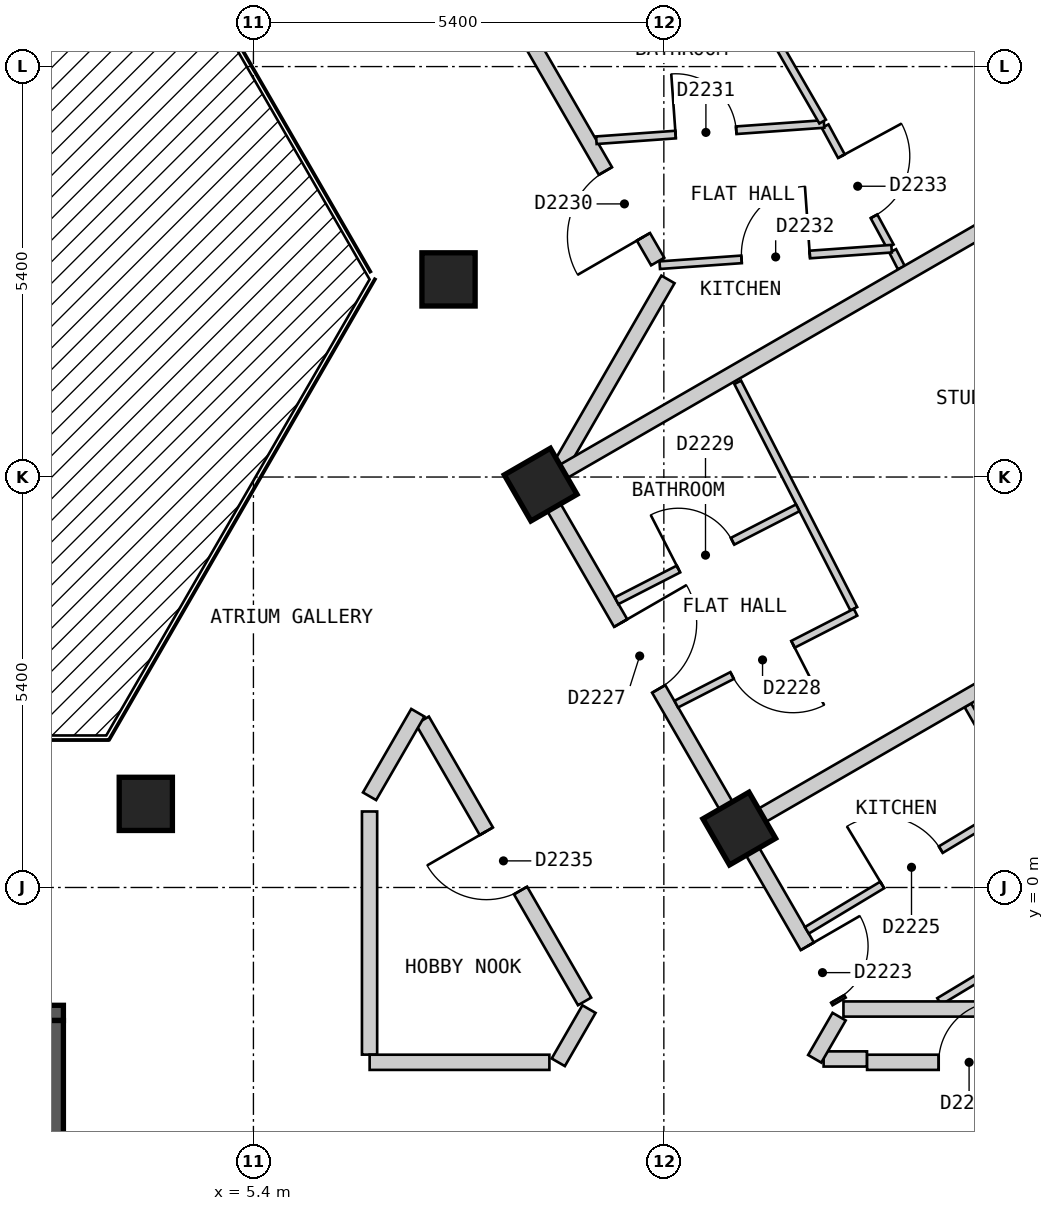
"""IFC4 building model, lengths in metres.
Left out: names, types, materials, properties, quantities, classifications, styles, units other than length and angle.
Written with IfcOpenShell. Run it as: python <this file> out.ifc"""

import sys

from ifc_helpers import new_model, si_unit, direction, frame, frame_2d, origin, origin_2d, place, context, subcontext, project, spatial, polyline, rectangle, outline, extrude, element, fill, save


model = new_model("IFC4")
c1 = context("Model", 3, precision=1e-05, world=origin(), true_north=direction((0.0, 1.0)))
c2 = subcontext(c1, "Body", "Model", "MODEL_VIEW")
j1 = project(units=[si_unit("LENGTHUNIT", "METRE"), si_unit("PLANEANGLEUNIT", "RADIAN")], contexts=[c1])
p1 = place(None, origin())
s1 = spatial("IfcSite", under=j1, at=p1, CompositionType="ELEMENT")
p2 = place(p1, origin())
s2 = spatial("IfcBuilding", under=s1, at=p2, CompositionType="ELEMENT")
p3 = place(p2, frame((0.0, 0.0, 223.8)))
s3 = spatial("IfcBuildingStorey", under=s2, at=p3, CompositionType="ELEMENT", Elevation=223.8)
for number, where, z_axis, x_axis in (
    (1, (11.792, 0.775, 0.0), (0.0, 0.0, 1.0), (-0.5, 0.866, 0.0)),
    (2, (3.984, 1.1, 0.0), (0.0, 0.0, 1.0), (1.0, 0.0, 0.0)),
    (3, (9.179, 5.3, 0.0), (0.0, 0.0, 1.0), (-0.5, 0.866, 0.0)),
    (4, (7.967, 8.0, 0.0), (0.0, 0.0, 1.0), (1.0, 0.0, 0.0)),
):
    element("IfcColumn", number, at=place(p3, frame(where, z_axis=z_axis, x_axis=x_axis)), inside=s3, PredefinedType="COLUMN", context=c2, shape_type="SweptSolid", body=[
        extrude(rectangle(XDim=0.7, YDim=0.7, at=origin_2d()), origin(), (0.0, 0.0, 1.0), 3.0),
    ])
p4 = place(p3, frame((23.599, 0.825, 0.0), z_axis=(0.0, 0.0, 1.0), x_axis=(-0.500003656944, 0.866023292436, 0.0)))
e5 = element("IfcWall", 5, at=p4, inside=s3, PredefinedType="SOLIDWALL", context=c2, shape_type="SweptSolid", body=[
    extrude(outline(polyline([(0.0, -0.15), (22.17, -0.15), (22.09, 0.15), (0.08, 0.15), (0.0, -0.15)])), origin(), (0.0, 0.0, 1.0), 2.7),
])
p5 = place(p4, frame((2.497, 0.0, 0.15)))
e6 = element("IfcOpeningElement", 6, at=p5, cuts=e5, PredefinedType="OPENING", context=c2, shape_type="SweptSolid", body=[
    extrude(rectangle(XDim=1.5, YDim=2.1, at=frame_2d((0.75, 1.05))), frame((0.0, 0.16, 0.0), z_axis=(0.0, -1.0, 0.0), x_axis=(1.0, 0.0, 0.0)), (0.0, 0.0, 1.0), 0.32),
])
p6 = place(p4, frame((7.723, 0.0, 0.15)))
e7 = element("IfcOpeningElement", 7, at=p6, cuts=e5, PredefinedType="OPENING", context=c2, shape_type="SweptSolid", body=[
    extrude(rectangle(XDim=1.5, YDim=2.1, at=frame_2d((0.75, 1.05))), frame((0.0, 0.16, 0.0), z_axis=(0.0, -1.0, 0.0), x_axis=(1.0, 0.0, 0.0)), (0.0, 0.0, 1.0), 0.32),
])
p7 = place(p4, frame((12.948, 0.0, 0.15)))
e8 = element("IfcOpeningElement", 8, at=p7, cuts=e5, PredefinedType="OPENING", context=c2, shape_type="SweptSolid", body=[
    extrude(rectangle(XDim=1.5, YDim=2.1, at=frame_2d((0.75, 1.05))), frame((0.0, 0.16, 0.0), z_axis=(0.0, -1.0, 0.0), x_axis=(1.0, 0.0, 0.0)), (0.0, 0.0, 1.0), 0.32),
])
p8 = place(p4, frame((18.173, 0.0, 0.15)))
e9 = element("IfcOpeningElement", 9, at=p8, cuts=e5, PredefinedType="OPENING", context=c2, shape_type="SweptSolid", body=[
    extrude(rectangle(XDim=1.5, YDim=2.1, at=frame_2d((0.75, 1.05))), frame((0.0, 0.16, 0.0), z_axis=(0.0, -1.0, 0.0), x_axis=(1.0, 0.0, 0.0)), (0.0, 0.0, 1.0), 0.32),
])
p9 = place(p3, frame((-2.9, -1.65, 0.0), z_axis=(0.0, 0.0, 1.0), x_axis=(1.0, 0.0, 0.0)))
e10 = element("IfcWall", 10, at=p9, inside=s3, PredefinedType="SOLIDWALL", context=c2, shape_type="SweptSolid", body=[
    extrude(rectangle(XDim=5.8, YDim=0.2, at=frame_2d((2.9, 0.0))), origin(), (0.0, 0.0, 1.0), 2.7),
])
p10 = place(p9, frame((0.3, 0.0, 0.0)))
e11 = element("IfcOpeningElement", 11, at=p10, cuts=e10, PredefinedType="OPENING", context=c2, shape_type="SweptSolid", body=[
    extrude(rectangle(XDim=1.2, YDim=2.1, at=frame_2d((0.6, 1.05))), frame((0.0, 0.11, 0.0), z_axis=(0.0, -1.0, 0.0), x_axis=(1.0, 0.0, 0.0)), (0.0, 0.0, 1.0), 0.22),
])
p11 = place(p3, frame((2.8, -4.5, 0.0), z_axis=(0.0, 0.0, 1.0), x_axis=(0.0, 1.0, 0.0)))
e12 = element("IfcWall", 12, at=p11, inside=s3, PredefinedType="SOLIDWALL", context=c2, shape_type="SweptSolid", body=[
    extrude(rectangle(XDim=2.75, YDim=0.2, at=frame_2d((1.375, 0.0))), origin(), (0.0, 0.0, 1.0), 2.7),
])
p12 = place(p3, frame((7.622, 2.199, 0.0), z_axis=(0.0, 0.0, 1.0), x_axis=(0.499994660107, -0.866028486751, 0.0)))
e13 = element("IfcWall", 13, at=p12, inside=s3, PredefinedType="PARTITIONING", context=c2, shape_type="SweptSolid", body=[
    extrude(rectangle(XDim=4.27, YDim=0.2, at=frame_2d((2.135, 0.0))), origin(), (0.0, 0.0, 1.0), 2.7),
])
p13 = place(p12, frame((1.685, 0.0, 0.0)))
e14 = element("IfcOpeningElement", 14, at=p13, cuts=e13, PredefinedType="OPENING", context=c2, shape_type="SweptSolid", body=[
    extrude(rectangle(XDim=0.9, YDim=2.1, at=frame_2d((0.45, 1.05))), frame((0.0, 0.11, 0.0), z_axis=(0.0, -1.0, 0.0), x_axis=(1.0, 0.0, 0.0)), (0.0, 0.0, 1.0), 0.22),
])
p14 = place(p3, frame((9.238, 5.2, 0.0), z_axis=(0.0, 0.0, 1.0), x_axis=(0.500025705601, -0.86601056214, 0.0)))
e15 = element("IfcWall", 15, at=p14, inside=s3, PredefinedType="PARTITIONING", context=c2, shape_type="SweptSolid", body=[
    extrude(rectangle(XDim=7.735, YDim=0.2, at=frame_2d((3.868, 0.0))), origin(), (0.0, 0.0, 1.0), 2.7),
])
p15 = place(p14, frame((6.898, 0.0, 0.0)))
e16 = element("IfcOpeningElement", 16, at=p15, cuts=e15, PredefinedType="OPENING", context=c2, shape_type="SweptSolid", body=[
    extrude(rectangle(XDim=0.8, YDim=2.1, at=frame_2d((0.4, 1.05))), frame((0.0, 0.11, 0.0), z_axis=(0.0, -1.0, 0.0), x_axis=(1.0, 0.0, 0.0)), (0.0, 0.0, 1.0), 0.22),
])
p16 = place(p14, frame((1.988, 0.0, 0.0)))
e17 = element("IfcOpeningElement", 17, at=p16, cuts=e15, PredefinedType="OPENING", context=c2, shape_type="SweptSolid", body=[
    extrude(rectangle(XDim=1.0, YDim=2.1, at=frame_2d((0.5, 1.05))), frame((0.0, 0.11, 0.0), z_axis=(0.0, -1.0, 0.0), x_axis=(1.0, 0.0, 0.0)), (0.0, 0.0, 1.0), 0.22),
])
p17 = place(p3, frame((5.485, 17.3, 0.0), z_axis=(0.0, 0.0, 1.0), x_axis=(0.500017221754, -0.866015460572, 0.0)))
e18 = element("IfcWall", 18, at=p17, inside=s3, PredefinedType="PARTITIONING", context=c2, shape_type="SweptSolid", body=[
    extrude(rectangle(XDim=10.468, YDim=0.2, at=frame_2d((5.234, 0.0))), origin(), (0.0, 0.0, 1.0), 2.7),
])
p18 = place(p17, frame((9.092, 0.0, 0.0)))
e19 = element("IfcOpeningElement", 19, at=p18, cuts=e18, PredefinedType="OPENING", context=c2, shape_type="SweptSolid", body=[
    extrude(rectangle(XDim=1.0, YDim=2.1, at=frame_2d((0.5, 1.05))), frame((0.0, 0.11, 0.0), z_axis=(0.0, -1.0, 0.0), x_axis=(1.0, 0.0, 0.0)), (0.0, 0.0, 1.0), 0.22),
])
p19 = place(p3, frame((6.928, 1.0, 0.0), z_axis=(0.0, 0.0, 1.0), x_axis=(0.0, -1.0, 0.0)))
e20 = element("IfcWall", 20, at=p19, inside=s3, PredefinedType="PARTITIONING", context=c2, shape_type="SweptSolid", body=[
    extrude(rectangle(XDim=3.199, YDim=0.2, at=frame_2d((1.6, 0.0))), origin(), (0.0, 0.0, 1.0), 2.7),
])
p20 = place(p3, frame((12.902, -2.256, 0.0), z_axis=(0.0, 0.0, 1.0), x_axis=(1.0, 0.0, 0.0)))
e21 = element("IfcWall", 21, at=p20, inside=s3, PredefinedType="PARTITIONING", context=c2, shape_type="SweptSolid", body=[
    extrude(rectangle(XDim=0.571, YDim=0.2, at=frame_2d((0.285, 0.0))), origin(), (0.0, 0.0, 1.0), 2.7),
])
p21 = place(p3, frame((6.929, -2.3, 0.0), z_axis=(0.0, 0.0, 1.0), x_axis=(1.0, 0.0, 0.0)))
e22 = element("IfcWall", 22, at=p21, inside=s3, PredefinedType="PARTITIONING", context=c2, shape_type="SweptSolid", body=[
    extrude(rectangle(XDim=2.365, YDim=0.2, at=frame_2d((1.183, 0.0))), origin(), (0.0, 0.0, 1.0), 2.7),
])
p22 = place(p3, frame((13.474, -2.3, 0.0), z_axis=(0.0, 0.0, 1.0), x_axis=(1.0, 0.0, 0.0)))
e23 = element("IfcWall", 23, at=p22, inside=s3, PredefinedType="PARTITIONING", context=c2, shape_type="SweptSolid", body=[
    extrude(rectangle(XDim=2.934, YDim=0.2, at=frame_2d((1.467, 0.0))), origin(), (0.0, 0.0, 1.0), 2.7),
])
p23 = place(p22, frame((0.942, 0.0, 0.0)))
e24 = element("IfcOpeningElement", 24, at=p23, cuts=e23, PredefinedType="OPENING", context=c2, shape_type="SweptSolid", body=[
    extrude(rectangle(XDim=0.8, YDim=2.1, at=frame_2d((0.4, 1.05))), frame((0.0, 0.11, 0.0), z_axis=(0.0, -1.0, 0.0), x_axis=(1.0, 0.0, 0.0)), (0.0, 0.0, 1.0), 0.22),
])
p24 = place(p3, frame((6.928, 1.2, 0.0), z_axis=(0.0, 0.0, 1.0), x_axis=(0.500255167297, 0.865878032746, 0.0)))
e25 = element("IfcWall", 25, at=p24, inside=s3, PredefinedType="PARTITIONING", context=c2, shape_type="SweptSolid", body=[
    extrude(rectangle(XDim=1.269, YDim=0.2, at=frame_2d((0.635, 0.0))), origin(), (0.0, 0.0, 1.0), 2.7),
])
p25 = place(p3, frame((9.354, 5.401, 0.0), z_axis=(0.0, 0.0, 1.0), x_axis=(0.499849222119, 0.866112437936, 0.0)))
e26 = element("IfcWall", 26, at=p25, inside=s3, PredefinedType="PARTITIONING", context=c2, shape_type="SweptSolid", body=[
    extrude(rectangle(XDim=3.001, YDim=0.2, at=frame_2d((1.5, 0.0))), origin(), (0.0, 0.0, 1.0), 2.7),
])
p26 = place(p3, frame((9.411, -2.3, 0.0), z_axis=(0.0, 0.0, 1.0), x_axis=(0.499940363534, 0.866059832176, 0.0)))
e27 = element("IfcWall", 27, at=p26, inside=s3, PredefinedType="PARTITIONING", context=c2, shape_type="SweptSolid", body=[
    extrude(rectangle(XDim=0.808, YDim=0.2, at=frame_2d((0.404, 0.0))), origin(), (0.0, 0.0, 1.0), 2.7),
])
p27 = place(p3, frame((12.785, -2.254, 0.0), z_axis=(0.0, 0.0, 1.0), x_axis=(0.500766044352, 0.865582675903, 0.0)))
e28 = element("IfcWall", 28, at=p27, inside=s3, PredefinedType="PARTITIONING", context=c2, shape_type="SweptSolid", body=[
    extrude(rectangle(XDim=0.641, YDim=0.2, at=frame_2d((0.321, 0.0))), origin(), (0.0, 0.0, 1.0), 2.7),
])
p28 = place(p3, frame((14.8, 2.397, 0.0), z_axis=(0.0, 0.0, 1.0), x_axis=(0.49989805765, -0.866084252228, 0.0)))
e29 = element("IfcWall", 29, at=p28, inside=s3, PredefinedType="PARTITIONING", context=c2, shape_type="SweptSolid", body=[
    extrude(rectangle(XDim=1.404, YDim=0.1, at=frame_2d((0.702, 0.0))), origin(), (0.0, 0.0, 1.0), 2.7),
])
p29 = place(p3, frame((12.922, 10.016, 0.0), z_axis=(0.0, 0.0, 1.0), x_axis=(0.476510550025, -0.879168752695, 0.0)))
e30 = element("IfcWall", 30, at=p29, inside=s3, PredefinedType="PARTITIONING", context=c2, shape_type="SweptSolid", body=[
    extrude(rectangle(XDim=1.798, YDim=0.1, at=frame_2d((0.899, 0.0))), origin(), (0.0, 0.0, 1.0), 2.7),
])
p30 = place(p29, frame((0.449, 0.0, 0.0)))
e31 = element("IfcOpeningElement", 31, at=p30, cuts=e30, PredefinedType="OPENING", context=c2, shape_type="SweptSolid", body=[
    extrude(rectangle(XDim=0.9, YDim=2.1, at=frame_2d((0.45, 1.05))), frame((0.0, 0.06, 0.0), z_axis=(0.0, -1.0, 0.0), x_axis=(1.0, 0.0, 0.0)), (0.0, 0.0, 1.0), 0.12),
])
p31 = place(p3, frame((13.811, 8.375, 0.0), z_axis=(0.0, 0.0, 1.0), x_axis=(0.457058020142, -0.889436881529, 0.0)))
e32 = element("IfcWall", 32, at=p31, inside=s3, PredefinedType="PARTITIONING", context=c2, shape_type="SweptSolid", body=[
    extrude(rectangle(XDim=0.247, YDim=0.1, at=frame_2d((0.124, 0.0))), origin(), (0.0, 0.0, 1.0), 2.7),
])
p32 = place(p3, frame((11.772, 6.646, 0.0), z_axis=(0.0, 0.0, 1.0), x_axis=(0.456175983405, -0.889889584254, 0.0)))
e33 = element("IfcWall", 33, at=p32, inside=s3, PredefinedType="PARTITIONING", context=c2, shape_type="SweptSolid", body=[
    extrude(rectangle(XDim=3.348, YDim=0.1, at=frame_2d((1.674, 0.0))), origin(), (0.0, 0.0, 1.0), 2.7),
])
p33 = place(p3, frame((10.178, 3.772, 0.0), z_axis=(0.0, 0.0, 1.0), x_axis=(0.889732071959, 0.456483121405, 0.0)))
e34 = element("IfcWall", 34, at=p33, inside=s3, PredefinedType="PARTITIONING", context=c2, shape_type="SweptSolid", body=[
    extrude(rectangle(XDim=2.679, YDim=0.1, at=frame_2d((1.34, 0.0))), origin(), (0.0, 0.0, 1.0), 2.7),
])
p34 = place(p33, frame((0.915, 0.0, 0.0)))
e35 = element("IfcOpeningElement", 35, at=p34, cuts=e34, PredefinedType="OPENING", context=c2, shape_type="SweptSolid", body=[
    extrude(rectangle(XDim=0.8, YDim=2.1, at=frame_2d((0.4, 1.05))), frame((0.0, 0.06, 0.0), z_axis=(0.0, -1.0, 0.0), x_axis=(1.0, 0.0, 0.0)), (0.0, 0.0, 1.0), 0.12),
])
p35 = place(p3, frame((10.963, 2.412, 0.0), z_axis=(0.0, 0.0, 1.0), x_axis=(0.889943997558, 0.456069820543, 0.0)))
e36 = element("IfcWall", 36, at=p35, inside=s3, PredefinedType="PARTITIONING", context=c2, shape_type="SweptSolid", body=[
    extrude(rectangle(XDim=2.651, YDim=0.1, at=frame_2d((1.325, 0.0))), origin(), (0.0, 0.0, 1.0), 2.7),
])
p36 = place(p35, frame((0.826, 0.0, 0.0)))
e37 = element("IfcOpeningElement", 37, at=p36, cuts=e36, PredefinedType="OPENING", context=c2, shape_type="SweptSolid", body=[
    extrude(rectangle(XDim=0.9, YDim=2.1, at=frame_2d((0.45, 1.05))), frame((0.0, 0.06, 0.0), z_axis=(0.0, -1.0, 0.0), x_axis=(1.0, 0.0, 0.0)), (0.0, 0.0, 1.0), 0.12),
])
p37 = place(p3, frame((12.681, -0.564, 0.0), z_axis=(0.0, 0.0, 1.0), x_axis=(0.856575482301, 0.516021746752, 0.0)))
e38 = element("IfcWall", 38, at=p37, inside=s3, PredefinedType="PARTITIONING", context=c2, shape_type="SweptSolid", body=[
    extrude(rectangle(XDim=3.316, YDim=0.1, at=frame_2d((1.658, 0.0))), origin(), (0.0, 0.0, 1.0), 2.7),
])
p38 = place(p37, frame((1.158, 0.0, 0.0)))
e39 = element("IfcOpeningElement", 39, at=p38, cuts=e38, PredefinedType="OPENING", context=c2, shape_type="SweptSolid", body=[
    extrude(rectangle(XDim=0.9, YDim=2.1, at=frame_2d((0.45, 1.05))), frame((0.0, 0.06, 0.0), z_axis=(0.0, -1.0, 0.0), x_axis=(1.0, 0.0, 0.0)), (0.0, 0.0, 1.0), 0.12),
])
p39 = place(p3, frame((14.423, -1.499, 0.0), z_axis=(0.0, 0.0, 1.0), x_axis=(0.856512638305, 0.516126050905, 0.0)))
e40 = element("IfcWall", 40, at=p39, inside=s3, PredefinedType="PARTITIONING", context=c2, shape_type="SweptSolid", body=[
    extrude(rectangle(XDim=4.776, YDim=0.1, at=frame_2d((2.388, 0.0))), origin(), (0.0, 0.0, 1.0), 2.7),
])
p40 = place(p39, frame((1.936, 0.0, 0.0)))
e41 = element("IfcOpeningElement", 41, at=p40, cuts=e40, PredefinedType="OPENING", context=c2, shape_type="SweptSolid", body=[
    extrude(rectangle(XDim=0.8, YDim=2.1, at=frame_2d((0.4, 1.05))), frame((0.0, 0.06, 0.0), z_axis=(0.0, -1.0, 0.0), x_axis=(1.0, 0.0, 0.0)), (0.0, 0.0, 1.0), 0.12),
])
p41 = place(p3, frame((10.746, 8.187, 0.0), z_axis=(0.0, 0.0, 1.0), x_axis=(0.997477310687, 0.070986017387, 0.0)))
e42 = element("IfcWall", 42, at=p41, inside=s3, PredefinedType="PARTITIONING", context=c2, shape_type="SweptSolid", body=[
    extrude(rectangle(XDim=3.058, YDim=0.1, at=frame_2d((1.529, 0.0))), origin(), (0.0, 0.0, 1.0), 2.7),
])
p42 = place(p41, frame((1.079, 0.0, 0.0)))
e43 = element("IfcOpeningElement", 43, at=p42, cuts=e42, PredefinedType="OPENING", context=c2, shape_type="SweptSolid", body=[
    extrude(rectangle(XDim=0.9, YDim=2.1, at=frame_2d((0.45, 1.05))), frame((0.0, 0.06, 0.0), z_axis=(0.0, -1.0, 0.0), x_axis=(1.0, 0.0, 0.0)), (0.0, 0.0, 1.0), 0.12),
])
p43 = place(p3, frame((9.912, 9.831, 0.0), z_axis=(0.0, 0.0, 1.0), x_axis=(0.997459937941, 0.071229714326, 0.0)))
e44 = element("IfcWall", 44, at=p43, inside=s3, PredefinedType="PARTITIONING", context=c2, shape_type="SweptSolid", body=[
    extrude(rectangle(XDim=3.002, YDim=0.1, at=frame_2d((1.501, 0.0))), origin(), (0.0, 0.0, 1.0), 2.7),
])
p44 = place(p43, frame((1.045, 0.0, 0.0)))
e45 = element("IfcOpeningElement", 45, at=p44, cuts=e44, PredefinedType="OPENING", context=c2, shape_type="SweptSolid", body=[
    extrude(rectangle(XDim=0.8, YDim=2.1, at=frame_2d((0.4, 1.05))), frame((0.0, 0.06, 0.0), z_axis=(0.0, -1.0, 0.0), x_axis=(1.0, 0.0, 0.0)), (0.0, 0.0, 1.0), 0.12),
])
p45 = place(p3, frame((13.163, -1.599, 0.0), z_axis=(0.0, 0.0, 1.0), x_axis=(1.0, 0.0, 0.0)))
e46 = element("IfcWall", 46, at=p45, inside=s3, PredefinedType="PARTITIONING", context=c2, shape_type="SweptSolid", body=[
    extrude(rectangle(XDim=4.962, YDim=0.2, at=frame_2d((2.481, 0.0))), origin(), (0.0, 0.0, 1.0), 2.7),
])
p46 = place(p3, frame((11.879, 0.826, 0.0), z_axis=(0.0, 0.0, 1.0), x_axis=(0.866065245018, 0.499930986609, 0.0)))
e47 = element("IfcWall", 47, at=p46, inside=s3, PredefinedType="PARTITIONING", context=c2, shape_type="SweptSolid", body=[
    extrude(rectangle(XDim=10.0, YDim=0.2, at=frame_2d((5.0, 0.0))), origin(), (0.0, 0.0, 1.0), 2.7),
])
p47 = place(p3, frame((9.457, 5.461, 0.0), z_axis=(0.0, 0.0, 1.0), x_axis=(0.866043818878, 0.499968102766, 0.0)))
e48 = element("IfcWall", 48, at=p47, inside=s3, PredefinedType="PARTITIONING", context=c2, shape_type="SweptSolid", body=[
    extrude(rectangle(XDim=9.779, YDim=0.2, at=frame_2d((4.89, 0.0))), origin(), (0.0, 0.0, 1.0), 2.7),
])
p48 = place(p3, frame((11.417, 12.625, 0.0), z_axis=(0.0, 0.0, 1.0), x_axis=(0.500055103712, -0.865993587304, 0.0)))
e49 = element("IfcWall", 49, at=p48, inside=s3, PredefinedType="PARTITIONING", context=c2, shape_type="SweptSolid", body=[
    extrude(rectangle(XDim=2.944, YDim=0.1, at=frame_2d((1.472, 0.0))), origin(), (0.0, 0.0, 1.0), 2.7),
])
p49 = place(p23, origin())
e50 = element("IfcDoor", 50, at=p49, inside=s3, OperationType="SINGLE_SWING_RIGHT", PredefinedType="DOOR", context=c2, shape_type="SweptSolid", body=[
    extrude(rectangle(XDim=0.8, YDim=2.1, at=frame_2d((0.4, 1.05))), frame((0.0, 0.025, 0.0), z_axis=(0.0, -1.0, 0.0), x_axis=(1.0, 0.0, 0.0)), (0.0, 0.0, 1.0), 0.05),
])
fill(e24, e50)
p50 = place(p15, origin())
e51 = element("IfcDoor", 51, at=p50, inside=s3, OperationType="SINGLE_SWING_LEFT", PredefinedType="DOOR", context=c2, shape_type="SweptSolid", body=[
    extrude(rectangle(XDim=0.8, YDim=2.1, at=frame_2d((0.4, 1.05))), frame((0.0, 0.025, 0.0), z_axis=(0.0, -1.0, 0.0), x_axis=(1.0, 0.0, 0.0)), (0.0, 0.0, 1.0), 0.05),
])
fill(e16, e51)
p51 = place(p38, origin())
e52 = element("IfcDoor", 52, at=p51, inside=s3, OperationType="SINGLE_SWING_LEFT", PredefinedType="DOOR", context=c2, shape_type="SweptSolid", body=[
    extrude(rectangle(XDim=0.9, YDim=2.1, at=frame_2d((0.45, 1.05))), frame((0.0, 0.025, 0.0), z_axis=(0.0, -1.0, 0.0), x_axis=(1.0, 0.0, 0.0)), (0.0, 0.0, 1.0), 0.05),
])
fill(e39, e52)
p52 = place(p16, origin())
e53 = element("IfcDoor", 53, at=p52, inside=s3, OperationType="SINGLE_SWING_LEFT", PredefinedType="DOOR", context=c2, shape_type="SweptSolid", body=[
    extrude(rectangle(XDim=1.0, YDim=2.1, at=frame_2d((0.5, 1.05))), frame((0.0, 0.025, 0.0), z_axis=(0.0, -1.0, 0.0), x_axis=(1.0, 0.0, 0.0)), (0.0, 0.0, 1.0), 0.05),
])
fill(e17, e53)
p53 = place(p36, origin())
e54 = element("IfcDoor", 54, at=p53, inside=s3, OperationType="SINGLE_SWING_RIGHT", PredefinedType="DOOR", context=c2, shape_type="SweptSolid", body=[
    extrude(rectangle(XDim=0.9, YDim=2.1, at=frame_2d((0.45, 1.05))), frame((0.0, 0.025, 0.0), z_axis=(0.0, -1.0, 0.0), x_axis=(1.0, 0.0, 0.0)), (0.0, 0.0, 1.0), 0.05),
])
fill(e37, e54)
p54 = place(p34, origin())
e55 = element("IfcDoor", 55, at=p54, inside=s3, OperationType="SINGLE_SWING_LEFT", PredefinedType="DOOR", context=c2, shape_type="SweptSolid", body=[
    extrude(rectangle(XDim=0.8, YDim=2.1, at=frame_2d((0.4, 1.05))), frame((0.0, 0.025, 0.0), z_axis=(0.0, -1.0, 0.0), x_axis=(1.0, 0.0, 0.0)), (0.0, 0.0, 1.0), 0.05),
])
fill(e35, e55)
p55 = place(p18, origin())
e56 = element("IfcDoor", 56, at=p55, inside=s3, OperationType="SINGLE_SWING_RIGHT", PredefinedType="DOOR", context=c2, shape_type="SweptSolid", body=[
    extrude(rectangle(XDim=1.0, YDim=2.1, at=frame_2d((0.5, 1.05))), frame((0.0, 0.025, 0.0), z_axis=(0.0, -1.0, 0.0), x_axis=(1.0, 0.0, 0.0)), (0.0, 0.0, 1.0), 0.05),
])
fill(e19, e56)
p56 = place(p44, origin())
e57 = element("IfcDoor", 57, at=p56, inside=s3, OperationType="SINGLE_SWING_LEFT", PredefinedType="DOOR", context=c2, shape_type="SweptSolid", body=[
    extrude(rectangle(XDim=0.8, YDim=2.1, at=frame_2d((0.4, 1.05))), frame((0.0, 0.025, 0.0), z_axis=(0.0, -1.0, 0.0), x_axis=(1.0, 0.0, 0.0)), (0.0, 0.0, 1.0), 0.05),
])
fill(e45, e57)
p57 = place(p42, origin())
e58 = element("IfcDoor", 58, at=p57, inside=s3, OperationType="SINGLE_SWING_RIGHT", PredefinedType="DOOR", context=c2, shape_type="SweptSolid", body=[
    extrude(rectangle(XDim=0.9, YDim=2.1, at=frame_2d((0.45, 1.05))), frame((0.0, 0.025, 0.0), z_axis=(0.0, -1.0, 0.0), x_axis=(1.0, 0.0, 0.0)), (0.0, 0.0, 1.0), 0.05),
])
fill(e43, e58)
p58 = place(p30, origin())
e59 = element("IfcDoor", 59, at=p58, inside=s3, OperationType="SINGLE_SWING_LEFT", PredefinedType="DOOR", context=c2, shape_type="SweptSolid", body=[
    extrude(rectangle(XDim=0.9, YDim=2.1, at=frame_2d((0.45, 1.05))), frame((0.0, 0.025, 0.0), z_axis=(0.0, -1.0, 0.0), x_axis=(1.0, 0.0, 0.0)), (0.0, 0.0, 1.0), 0.05),
])
fill(e31, e59)
p59 = place(p13, origin())
e60 = element("IfcDoor", 60, at=p59, inside=s3, OperationType="SINGLE_SWING_LEFT", PredefinedType="DOOR", context=c2, shape_type="SweptSolid", body=[
    extrude(rectangle(XDim=0.9, YDim=2.1, at=frame_2d((0.45, 1.05))), frame((0.0, 0.025, 0.0), z_axis=(0.0, -1.0, 0.0), x_axis=(1.0, 0.0, 0.0)), (0.0, 0.0, 1.0), 0.05),
])
fill(e14, e60)
save(model, sys.argv[1])
